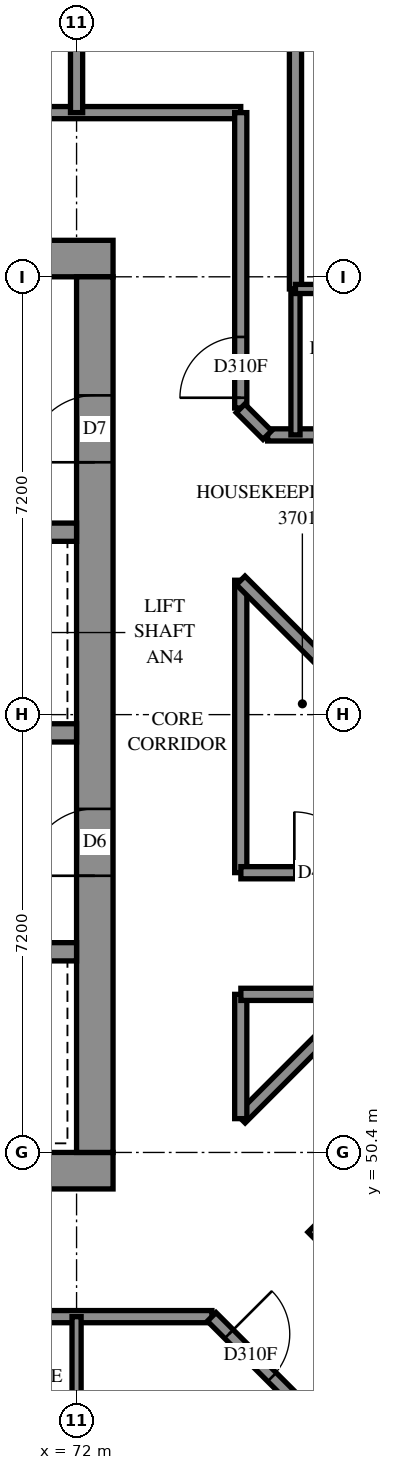
"""IFC4 building model, lengths in metres.
Left out: names, types, materials, properties, quantities, classifications, styles, units other than length and angle.
Written with IfcOpenShell. Run it as: python <this file> out.ifc"""

import sys

from ifc_helpers import new_model, si_unit, direction, frame, frame_2d, origin, place, context, subcontext, project, spatial, rectangle, extrude, element, fill, save


model = new_model("IFC4")
c1 = context("Model", 3, precision=1e-05, world=origin(), true_north=direction((0.0, 1.0)))
c2 = subcontext(c1, "Body", "Model", "MODEL_VIEW")
j1 = project(units=[si_unit("LENGTHUNIT", "METRE"), si_unit("PLANEANGLEUNIT", "RADIAN")], contexts=[c1])
p1 = place(None, origin())
s1 = spatial("IfcSite", under=j1, at=p1, CompositionType="ELEMENT")
p2 = place(p1, origin())
s2 = spatial("IfcBuilding", under=s1, at=p2, CompositionType="ELEMENT")
p3 = place(p2, frame((0.0, 0.0, 138.8)))
s3 = spatial("IfcBuildingStorey", under=s2, at=p3, CompositionType="ELEMENT", Elevation=138.8)
p4 = place(p3, frame((57.0, 50.1, -0.3), z_axis=(0.0, 0.0, 1.0), x_axis=(1.0, 0.0, 0.0)))
e1 = element("IfcWall", 1, at=p4, inside=s3, PredefinedType="SHEAR", context=c2, shape_type="SweptSolid", body=[
    extrude(rectangle(XDim=15.6, YDim=0.6, at=frame_2d((7.8, 0.0))), origin(), (0.0, 0.0, 1.0), 2.7),
])
p5 = place(p3, frame((57.0, 65.1, -0.3), z_axis=(0.0, 0.0, 1.0), x_axis=(1.0, 0.0, 0.0)))
e2 = element("IfcWall", 2, at=p5, inside=s3, PredefinedType="SHEAR", context=c2, shape_type="SweptSolid", body=[
    extrude(rectangle(XDim=15.6, YDim=0.6, at=frame_2d((7.8, 0.0))), origin(), (0.0, 0.0, 1.0), 2.7),
])
p6 = place(p5, frame((10.6, 0.0, 0.3)))
e3 = element("IfcOpeningElement", 3, at=p6, cuts=e2, PredefinedType="OPENING", context=c2, shape_type="SweptSolid", body=[
    extrude(rectangle(XDim=0.8, YDim=2.1, at=frame_2d((0.4, 1.05))), frame((0.0, 0.31, 0.0), z_axis=(0.0, -1.0, 0.0), x_axis=(1.0, 0.0, 0.0)), (0.0, 0.0, 1.0), 0.62),
])
p7 = place(p3, frame((72.3, 50.4, -0.3), z_axis=(0.0, 0.0, 1.0), x_axis=(0.0, 1.0, 0.0)))
e4 = element("IfcWall", 4, at=p7, inside=s3, PredefinedType="SHEAR", context=c2, shape_type="SweptSolid", body=[
    extrude(rectangle(XDim=14.4, YDim=0.6, at=frame_2d((7.2, 0.0))), origin(), (0.0, 0.0, 1.0), 2.7),
])
p8 = place(p7, frame((4.55, 0.0, 0.3)))
e5 = element("IfcOpeningElement", 5, at=p8, cuts=e4, PredefinedType="OPENING", context=c2, shape_type="SweptSolid", body=[
    extrude(rectangle(XDim=1.1, YDim=2.1, at=frame_2d((0.55, 1.05))), frame((0.0, 0.31, 0.0), z_axis=(0.0, -1.0, 0.0), x_axis=(1.0, 0.0, 0.0)), (0.0, 0.0, 1.0), 0.62),
])
p9 = place(p7, frame((11.35, 0.0, 0.3)))
e6 = element("IfcOpeningElement", 6, at=p9, cuts=e4, PredefinedType="OPENING", context=c2, shape_type="SweptSolid", body=[
    extrude(rectangle(XDim=1.1, YDim=2.1, at=frame_2d((0.55, 1.05))), frame((0.0, 0.31, 0.0), z_axis=(0.0, -1.0, 0.0), x_axis=(1.0, 0.0, 0.0)), (0.0, 0.0, 1.0), 0.62),
])
p10 = place(p3, frame((57.6, 53.7, 0.0), z_axis=(0.0, 0.0, 1.0), x_axis=(1.0, 0.0, 0.0)))
e7 = element("IfcWall", 7, at=p10, inside=s3, PredefinedType="SOLIDWALL", context=c2, shape_type="SweptSolid", body=[
    extrude(rectangle(XDim=14.4, YDim=0.3, at=frame_2d((7.2, 0.0))), origin(), (0.0, 0.0, 1.0), 3.1),
])
p11 = place(p10, frame((1.35, 0.0, 0.0)))
e8 = element("IfcOpeningElement", 8, at=p11, cuts=e7, PredefinedType="OPENING", context=c2, shape_type="SweptSolid", body=[
    extrude(rectangle(XDim=0.9, YDim=2.1, at=frame_2d((0.45, 1.05))), frame((0.0, 0.16, 0.0), z_axis=(0.0, -1.0, 0.0), x_axis=(1.0, 0.0, 0.0)), (0.0, 0.0, 1.0), 0.32),
])
p12 = place(p10, frame((4.95, 0.0, 0.0)))
e9 = element("IfcOpeningElement", 9, at=p12, cuts=e7, PredefinedType="OPENING", context=c2, shape_type="SweptSolid", body=[
    extrude(rectangle(XDim=0.9, YDim=2.1, at=frame_2d((0.45, 1.05))), frame((0.0, 0.16, 0.0), z_axis=(0.0, -1.0, 0.0), x_axis=(1.0, 0.0, 0.0)), (0.0, 0.0, 1.0), 0.32),
])
p13 = place(p10, frame((8.55, 0.0, 0.0)))
e10 = element("IfcOpeningElement", 10, at=p13, cuts=e7, PredefinedType="OPENING", context=c2, shape_type="SweptSolid", body=[
    extrude(rectangle(XDim=0.9, YDim=2.1, at=frame_2d((0.45, 1.05))), frame((0.0, 0.16, 0.0), z_axis=(0.0, -1.0, 0.0), x_axis=(1.0, 0.0, 0.0)), (0.0, 0.0, 1.0), 0.32),
])
p14 = place(p10, frame((12.05, 0.0, 0.0)))
e11 = element("IfcOpeningElement", 11, at=p14, cuts=e7, PredefinedType="OPENING", context=c2, shape_type="SweptSolid", body=[
    extrude(rectangle(XDim=1.1, YDim=2.1, at=frame_2d((0.55, 1.05))), frame((0.0, 0.16, 0.0), z_axis=(0.0, -1.0, 0.0), x_axis=(1.0, 0.0, 0.0)), (0.0, 0.0, 1.0), 0.32),
])
p15 = place(p3, frame((57.6, 57.3, 0.0), z_axis=(0.0, 0.0, 1.0), x_axis=(1.0, 0.0, 0.0)))
e12 = element("IfcWall", 12, at=p15, inside=s3, PredefinedType="SOLIDWALL", context=c2, shape_type="SweptSolid", body=[
    extrude(rectangle(XDim=14.4, YDim=0.3, at=frame_2d((7.2, 0.0))), origin(), (0.0, 0.0, 1.0), 3.1),
])
p16 = place(p15, frame((1.25, 0.0, 0.0)))
e13 = element("IfcOpeningElement", 13, at=p16, cuts=e12, PredefinedType="OPENING", context=c2, shape_type="SweptSolid", body=[
    extrude(rectangle(XDim=1.1, YDim=2.1, at=frame_2d((0.55, 1.05))), frame((0.0, 0.16, 0.0), z_axis=(0.0, -1.0, 0.0), x_axis=(1.0, 0.0, 0.0)), (0.0, 0.0, 1.0), 0.32),
])
p17 = place(p15, frame((4.85, 0.0, 0.0)))
e14 = element("IfcOpeningElement", 14, at=p17, cuts=e12, PredefinedType="OPENING", context=c2, shape_type="SweptSolid", body=[
    extrude(rectangle(XDim=1.1, YDim=2.1, at=frame_2d((0.55, 1.05))), frame((0.0, 0.16, 0.0), z_axis=(0.0, -1.0, 0.0), x_axis=(1.0, 0.0, 0.0)), (0.0, 0.0, 1.0), 0.32),
])
p18 = place(p15, frame((8.45, 0.0, 0.0)))
e15 = element("IfcOpeningElement", 15, at=p18, cuts=e12, PredefinedType="OPENING", context=c2, shape_type="SweptSolid", body=[
    extrude(rectangle(XDim=1.1, YDim=2.1, at=frame_2d((0.55, 1.05))), frame((0.0, 0.16, 0.0), z_axis=(0.0, -1.0, 0.0), x_axis=(1.0, 0.0, 0.0)), (0.0, 0.0, 1.0), 0.32),
])
p19 = place(p15, frame((12.05, 0.0, 0.0)))
e16 = element("IfcOpeningElement", 16, at=p19, cuts=e12, PredefinedType="OPENING", context=c2, shape_type="SweptSolid", body=[
    extrude(rectangle(XDim=1.1, YDim=2.1, at=frame_2d((0.55, 1.05))), frame((0.0, 0.16, 0.0), z_axis=(0.0, -1.0, 0.0), x_axis=(1.0, 0.0, 0.0)), (0.0, 0.0, 1.0), 0.32),
])
p20 = place(p3, frame((64.8, 60.6, 0.0), z_axis=(0.0, 0.0, 1.0), x_axis=(1.0, 0.0, 0.0)))
e17 = element("IfcWall", 17, at=p20, inside=s3, PredefinedType="SOLIDWALL", context=c2, shape_type="SweptSolid", body=[
    extrude(rectangle(XDim=7.2, YDim=0.3, at=frame_2d((3.6, 0.0))), origin(), (0.0, 0.0, 1.0), 3.1),
])
p21 = place(p3, frame((76.018, 49.302, -0.3), z_axis=(0.0, 0.0, 1.0), x_axis=(0.7071067812, -0.7071067812, 0.0)))
e18 = element("IfcWall", 18, at=p21, inside=s3, PredefinedType="SHEAR", context=c2, shape_type="SweptSolid", body=[
    extrude(rectangle(XDim=15.6, YDim=0.6, at=frame_2d((7.8, 0.0))), origin(), (0.0, 0.0, 1.0), 2.7),
])
p22 = place(p3, frame((54.9, 67.5, 0.0), z_axis=(0.0, 0.0, 1.0), x_axis=(1.0, 0.0, 0.0)))
e19 = element("IfcWall", 19, at=p22, inside=s3, PredefinedType="PARTITIONING", context=c2, shape_type="SweptSolid", body=[
    extrude(rectangle(XDim=19.8, YDim=0.2, at=frame_2d((9.9, 0.0))), origin(), (0.0, 0.0, 1.0), 3.1),
])
p23 = place(p22, frame((6.586, 0.0, 0.0)))
e20 = element("IfcOpeningElement", 20, at=p23, cuts=e19, PredefinedType="OPENING", context=c2, shape_type="SweptSolid", body=[
    extrude(rectangle(XDim=1.0, YDim=2.1, at=frame_2d((0.5, 1.05))), frame((0.0, 0.11, 0.0), z_axis=(0.0, -1.0, 0.0), x_axis=(1.0, 0.0, 0.0)), (0.0, 0.0, 1.0), 0.22),
])
p24 = place(p22, frame((14.089, 0.0, 0.0)))
e21 = element("IfcOpeningElement", 21, at=p24, cuts=e19, PredefinedType="OPENING", context=c2, shape_type="SweptSolid", body=[
    extrude(rectangle(XDim=1.0, YDim=2.1, at=frame_2d((0.5, 1.05))), frame((0.0, 0.11, 0.0), z_axis=(0.0, -1.0, 0.0), x_axis=(1.0, 0.0, 0.0)), (0.0, 0.0, 1.0), 0.22),
])
p25 = place(p3, frame((54.9, 47.7, 0.0), z_axis=(0.0, 0.0, 1.0), x_axis=(1.0, 0.0, 0.0)))
e22 = element("IfcWall", 22, at=p25, inside=s3, PredefinedType="PARTITIONING", context=c2, shape_type="SweptSolid", body=[
    extrude(rectangle(XDim=19.326, YDim=0.2, at=frame_2d((9.663, 0.0))), origin(), (0.0, 0.0, 1.0), 3.1),
])
p26 = place(p25, frame((5.0, 0.0, 0.0)))
e23 = element("IfcOpeningElement", 23, at=p26, cuts=e22, PredefinedType="OPENING", context=c2, shape_type="SweptSolid", body=[
    extrude(rectangle(XDim=0.9, YDim=2.1, at=frame_2d((0.45, 1.05))), frame((0.0, 0.11, 0.0), z_axis=(0.0, -1.0, 0.0), x_axis=(1.0, 0.0, 0.0)), (0.0, 0.0, 1.0), 0.22),
])
p27 = place(p25, frame((12.2, 0.0, 0.0)))
e24 = element("IfcOpeningElement", 24, at=p27, cuts=e22, PredefinedType="OPENING", context=c2, shape_type="SweptSolid", body=[
    extrude(rectangle(XDim=0.9, YDim=2.1, at=frame_2d((0.45, 1.05))), frame((0.0, 0.11, 0.0), z_axis=(0.0, -1.0, 0.0), x_axis=(1.0, 0.0, 0.0)), (0.0, 0.0, 1.0), 0.22),
])
p28 = place(p25, frame((6.7, 0.0, 0.0)))
e25 = element("IfcOpeningElement", 25, at=p28, cuts=e22, PredefinedType="OPENING", context=c2, shape_type="SweptSolid", body=[
    extrude(rectangle(XDim=0.9, YDim=2.1, at=frame_2d((0.45, 1.05))), frame((0.0, 0.11, 0.0), z_axis=(0.0, -1.0, 0.0), x_axis=(1.0, 0.0, 0.0)), (0.0, 0.0, 1.0), 0.22),
])
p29 = place(p25, frame((13.9, 0.0, 0.0)))
e26 = element("IfcOpeningElement", 26, at=p29, cuts=e22, PredefinedType="OPENING", context=c2, shape_type="SweptSolid", body=[
    extrude(rectangle(XDim=0.9, YDim=2.1, at=frame_2d((0.45, 1.05))), frame((0.0, 0.11, 0.0), z_axis=(0.0, -1.0, 0.0), x_axis=(1.0, 0.0, 0.0)), (0.0, 0.0, 1.0), 0.22),
])
p30 = place(p3, frame((75.6, 64.6, 0.0), z_axis=(0.0, 0.0, 1.0), x_axis=(0.0, 1.0, 0.0)))
e27 = element("IfcWall", 27, at=p30, inside=s3, PredefinedType="PARTITIONING", context=c2, shape_type="SweptSolid", body=[
    extrude(rectangle(XDim=8.159, YDim=0.2, at=frame_2d((4.079, 0.0))), origin(), (0.0, 0.0, 1.0), 3.1),
])
p31 = place(p3, frame((74.7, 62.642, 0.0), z_axis=(0.0, 0.0, 1.0), x_axis=(0.0, 1.0, 0.0)))
e28 = element("IfcWall", 28, at=p31, inside=s3, PredefinedType="PARTITIONING", context=c2, shape_type="SweptSolid", body=[
    extrude(rectangle(XDim=4.858, YDim=0.2, at=frame_2d((2.429, 0.0))), origin(), (0.0, 0.0, 1.0), 3.1),
])
p32 = place(p31, frame((0.169, 0.0, 0.0)))
e29 = element("IfcOpeningElement", 29, at=p32, cuts=e28, PredefinedType="OPENING", context=c2, shape_type="SweptSolid", body=[
    extrude(rectangle(XDim=1.0, YDim=2.1, at=frame_2d((0.5, 1.05))), frame((0.0, 0.11, 0.0), z_axis=(0.0, -1.0, 0.0), x_axis=(1.0, 0.0, 0.0)), (0.0, 0.0, 1.0), 0.22),
])
p33 = place(p3, frame((74.7, 55.002, 0.0), z_axis=(0.0, 0.0, 1.0), x_axis=(0.0, 1.0, 0.0)))
e30 = element("IfcWall", 30, at=p33, inside=s3, PredefinedType="PARTITIONING", context=c2, shape_type="SweptSolid", body=[
    extrude(rectangle(XDim=4.808, YDim=0.2, at=frame_2d((2.404, 0.0))), origin(), (0.0, 0.0, 1.0), 3.1),
])
p34 = place(p3, frame((74.223, 47.697, 0.0), z_axis=(0.0, 0.0, 1.0), x_axis=(0.7071067812, -0.7071067812, 0.0)))
e31 = element("IfcWall", 31, at=p34, inside=s3, PredefinedType="PARTITIONING", context=c2, shape_type="SweptSolid", body=[
    extrude(rectangle(XDim=4.63, YDim=0.2, at=frame_2d((2.315, 0.0))), origin(), (0.0, 0.0, 1.0), 3.1),
])
p35 = place(p34, frame((0.401, 0.0, 0.0)))
e32 = element("IfcOpeningElement", 32, at=p35, cuts=e31, PredefinedType="OPENING", context=c2, shape_type="SweptSolid", body=[
    extrude(rectangle(XDim=1.0, YDim=2.1, at=frame_2d((0.5, 1.05))), frame((0.0, 0.11, 0.0), z_axis=(0.0, -1.0, 0.0), x_axis=(1.0, 0.0, 0.0)), (0.0, 0.0, 1.0), 0.22),
])
p36 = place(p3, frame((75.142, 62.2, 0.0), z_axis=(0.0, 0.0, 1.0), x_axis=(1.0, 0.0, 0.0)))
e33 = element("IfcWall", 33, at=p36, inside=s3, PredefinedType="PARTITIONING", context=c2, shape_type="SweptSolid", body=[
    extrude(rectangle(XDim=4.058, YDim=0.2, at=frame_2d((2.029, 0.0))), origin(), (0.0, 0.0, 1.0), 3.1),
])
p37 = place(p36, frame((2.758, 0.0, 0.0)))
e34 = element("IfcOpeningElement", 34, at=p37, cuts=e33, PredefinedType="OPENING", context=c2, shape_type="SweptSolid", body=[
    extrude(rectangle(XDim=0.9, YDim=2.1, at=frame_2d((0.45, 1.05))), frame((0.0, 0.11, 0.0), z_axis=(0.0, -1.0, 0.0), x_axis=(1.0, 0.0, 0.0)), (0.0, 0.0, 1.0), 0.22),
])
p38 = place(p3, frame((74.702, 55.0, 0.0), z_axis=(0.0, 0.0, 1.0), x_axis=(1.0, 0.0, 0.0)))
e35 = element("IfcWall", 35, at=p38, inside=s3, PredefinedType="PARTITIONING", context=c2, shape_type="SweptSolid", body=[
    extrude(rectangle(XDim=4.044, YDim=0.2, at=frame_2d((2.022, 0.0))), origin(), (0.0, 0.0, 1.0), 3.1),
])
p39 = place(p38, frame((0.879, 0.0, 0.0)))
e36 = element("IfcOpeningElement", 36, at=p39, cuts=e35, PredefinedType="OPENING", context=c2, shape_type="SweptSolid", body=[
    extrude(rectangle(XDim=1.0, YDim=2.1, at=frame_2d((0.5, 1.05))), frame((0.0, 0.11, 0.0), z_axis=(0.0, -1.0, 0.0), x_axis=(1.0, 0.0, 0.0)), (0.0, 0.0, 1.0), 0.22),
])
p40 = place(p3, frame((74.699, 59.807, 0.0), z_axis=(0.0, 0.0, 1.0), x_axis=(0.7071067812, -0.7071067812, 0.0)))
e37 = element("IfcWall", 37, at=p40, inside=s3, PredefinedType="PARTITIONING", context=c2, shape_type="SweptSolid", body=[
    extrude(rectangle(XDim=3.957, YDim=0.2, at=frame_2d((1.978, 0.0))), origin(), (0.0, 0.0, 1.0), 3.1),
])
p41 = place(p3, frame((72.0, 67.5, 0.0), z_axis=(0.0, 0.0, 1.0), x_axis=(0.0, 1.0, 0.0)))
e38 = element("IfcWall", 38, at=p41, inside=s3, PredefinedType="PARTITIONING", context=c2, shape_type="SweptSolid", body=[
    extrude(rectangle(XDim=3.946, YDim=0.2, at=frame_2d((1.973, 0.0))), origin(), (0.0, 0.0, 1.0), 3.1),
])
p42 = place(p3, frame((74.701, 50.957, 0.0), z_axis=(0.0, 0.0, 1.0), x_axis=(0.7071067812, 0.7071067812, 0.0)))
e39 = element("IfcWall", 39, at=p42, inside=s3, PredefinedType="PARTITIONING", context=c2, shape_type="SweptSolid", body=[
    extrude(rectangle(XDim=2.888, YDim=0.2, at=frame_2d((1.444, 0.0))), origin(), (0.0, 0.0, 1.0), 3.1),
])
for number, where, z_axis, x_axis in (
    (40, (72.0, 45.3, 0.0), (0.0, 0.0, 1.0), (0.0, 1.0, 0.0)),
    (41, (75.6, 62.2, 0.0), (0.0, 0.0, 1.0), (0.0, 1.0, 0.0)),
):
    element("IfcWall", number, at=place(p3, frame(where, z_axis=z_axis, x_axis=x_axis)), inside=s3, PredefinedType="PARTITIONING", context=c2, shape_type="SweptSolid", body=[
        extrude(rectangle(XDim=2.4, YDim=0.15, at=frame_2d((1.2, 0.0))), origin(), (0.0, 0.0, 1.0), 3.1),
    ])
p43 = place(p3, frame((74.7, 50.956, 0.0), z_axis=(0.0, 0.0, 1.0), x_axis=(0.0, 1.0, 0.0)))
e42 = element("IfcWall", 42, at=p43, inside=s3, PredefinedType="PARTITIONING", context=c2, shape_type="SweptSolid", body=[
    extrude(rectangle(XDim=2.044, YDim=0.2, at=frame_2d((1.022, 0.0))), origin(), (0.0, 0.0, 1.0), 3.1),
])
p44 = place(p3, frame((74.702, 53.0, 0.0), z_axis=(0.0, 0.0, 1.0), x_axis=(1.0, 0.0, 0.0)))
e43 = element("IfcWall", 43, at=p44, inside=s3, PredefinedType="PARTITIONING", context=c2, shape_type="SweptSolid", body=[
    extrude(rectangle(XDim=2.042, YDim=0.2, at=frame_2d((1.021, 0.0))), origin(), (0.0, 0.0, 1.0), 3.1),
])
p45 = place(p3, frame((75.6, 64.6, 0.0), z_axis=(0.0, 0.0, 1.0), x_axis=(1.0, 0.0, 0.0)))
e44 = element("IfcWall", 44, at=p45, inside=s3, PredefinedType="PARTITIONING", context=c2, shape_type="SweptSolid", body=[
    extrude(rectangle(XDim=1.9, YDim=0.15, at=frame_2d((0.95, 0.0))), origin(), (0.0, 0.0, 1.0), 3.1),
])
p46 = place(p45, frame((0.607, 0.0, 0.0)))
e45 = element("IfcOpeningElement", 45, at=p46, cuts=e44, PredefinedType="OPENING", context=c2, shape_type="SweptSolid", body=[
    extrude(rectangle(XDim=0.8, YDim=2.1, at=frame_2d((0.4, 1.05))), frame((0.0, 0.085, 0.0), z_axis=(0.0, -1.0, 0.0), x_axis=(1.0, 0.0, 0.0)), (0.0, 0.0, 1.0), 0.17),
])
p47 = place(p3, frame((74.697, 62.637, 0.0), z_axis=(0.0, 0.0, 1.0), x_axis=(0.7071067812, -0.7071067812, 0.0)))
e46 = element("IfcWall", 46, at=p47, inside=s3, PredefinedType="PARTITIONING", context=c2, shape_type="SweptSolid", body=[
    extrude(rectangle(XDim=0.622, YDim=0.2, at=frame_2d((0.311, 0.0))), origin(), (0.0, 0.0, 1.0), 3.1),
])
p48 = place(p8, origin())
e47 = element("IfcDoor", 47, at=p48, inside=s3, OperationType="DOUBLE_DOOR_SINGLE_SWING", PredefinedType="DOOR", context=c2, shape_type="SweptSolid", body=[
    extrude(rectangle(XDim=1.1, YDim=2.1, at=frame_2d((0.55, 1.05))), frame((0.0, 0.025, 0.0), z_axis=(0.0, -1.0, 0.0), x_axis=(1.0, 0.0, 0.0)), (0.0, 0.0, 1.0), 0.05),
])
fill(e5, e47)
p49 = place(p9, origin())
e48 = element("IfcDoor", 48, at=p49, inside=s3, OperationType="SINGLE_SWING_RIGHT", PredefinedType="DOOR", context=c2, shape_type="SweptSolid", body=[
    extrude(rectangle(XDim=1.1, YDim=2.1, at=frame_2d((0.55, 1.05))), frame((0.0, 0.025, 0.0), z_axis=(0.0, -1.0, 0.0), x_axis=(1.0, 0.0, 0.0)), (0.0, 0.0, 1.0), 0.05),
])
fill(e6, e48)
p50 = place(p39, origin())
e49 = element("IfcDoor", 49, at=p50, inside=s3, OperationType="SINGLE_SWING_LEFT", PredefinedType="DOOR", context=c2, shape_type="SweptSolid", body=[
    extrude(rectangle(XDim=1.0, YDim=2.1, at=frame_2d((0.5, 1.05))), frame((0.0, 0.025, 0.0), z_axis=(0.0, -1.0, 0.0), x_axis=(1.0, 0.0, 0.0)), (0.0, 0.0, 1.0), 0.05),
])
fill(e36, e49)
p51 = place(p32, origin())
e50 = element("IfcDoor", 50, at=p51, inside=s3, OperationType="SINGLE_SWING_RIGHT", PredefinedType="DOOR", context=c2, shape_type="SweptSolid", body=[
    extrude(rectangle(XDim=1.0, YDim=2.1, at=frame_2d((0.5, 1.05))), frame((0.0, 0.025, 0.0), z_axis=(0.0, -1.0, 0.0), x_axis=(1.0, 0.0, 0.0)), (0.0, 0.0, 1.0), 0.05),
])
fill(e29, e50)
p52 = place(p35, origin())
e51 = element("IfcDoor", 51, at=p52, inside=s3, OperationType="SINGLE_SWING_LEFT", PredefinedType="DOOR", context=c2, shape_type="SweptSolid", body=[
    extrude(rectangle(XDim=1.0, YDim=2.1, at=frame_2d((0.5, 1.05))), frame((0.0, 0.025, 0.0), z_axis=(0.0, -1.0, 0.0), x_axis=(1.0, 0.0, 0.0)), (0.0, 0.0, 1.0), 0.05),
])
fill(e32, e51)
save(model, sys.argv[1])
